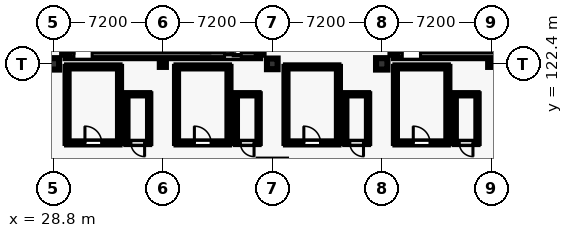
"""IFC4 building model, lengths in metres.
Left out: names, types, materials, properties, quantities, classifications, styles, units other than length and angle.
Written with IfcOpenShell. Run it as: python <this file> out.ifc"""

import sys

from ifc_helpers import new_model, si_unit, direction, frame, frame_2d, origin, origin_2d, place, context, subcontext, project, spatial, rectangle, hollow_rectangle, extrude, element, fill, save


model = new_model("IFC4")
c1 = context("Model", 3, precision=1e-05, world=origin(), true_north=direction((0.0, 1.0)))
c2 = subcontext(c1, "Body", "Model", "MODEL_VIEW")
j1 = project(units=[si_unit("LENGTHUNIT", "METRE"), si_unit("PLANEANGLEUNIT", "RADIAN")], contexts=[c1])
p1 = place(None, origin())
s1 = spatial("IfcSite", under=j1, at=p1, CompositionType="ELEMENT")
p2 = place(p1, origin())
s2 = spatial("IfcBuilding", under=s1, at=p2, CompositionType="ELEMENT")
p3 = place(p2, frame((0.0, 0.0, 9.6)))
s3 = spatial("IfcBuildingStorey", under=s2, at=p3, CompositionType="ELEMENT", Elevation=9.6)
p4 = place(p3, frame((28.8, 122.4, 0.0), z_axis=(0.0, 0.0, 1.0), x_axis=(1.0, 0.0, 0.0)))
e1 = element("IfcColumn", 1, at=p4, inside=s3, PredefinedType="COLUMN", context=c2, shape_type="SweptSolid", body=[
    extrude(rectangle(XDim=0.75, YDim=0.75, at=origin_2d()), origin(), (0.0, 0.0, 1.0), 4.2),
])
p5 = place(p3, frame((36.0, 122.4, 0.0), z_axis=(0.0, 0.0, 1.0), x_axis=(1.0, 0.0, 0.0)))
e2 = element("IfcColumn", 2, at=p5, inside=s3, PredefinedType="COLUMN", context=c2, shape_type="SweptSolid", body=[
    extrude(hollow_rectangle(XDim=0.4, YDim=0.4, WallThickness=0.02, at=origin_2d()), origin(), (0.0, 0.0, 1.0), 4.2),
])
p6 = place(p3, frame((43.2, 122.4, 0.0), z_axis=(0.0, 0.0, 1.0), x_axis=(1.0, 0.0, 0.0)))
e3 = element("IfcColumn", 3, at=p6, inside=s3, PredefinedType="COLUMN", context=c2, shape_type="SweptSolid", body=[
    extrude(rectangle(XDim=0.7, YDim=0.7, at=origin_2d()), origin(), (0.0, 0.0, 1.0), 4.2),
])
p7 = place(p3, frame((50.4, 122.4, 0.0), z_axis=(0.0, 0.0, 1.0), x_axis=(1.0, 0.0, 0.0)))
e4 = element("IfcColumn", 4, at=p7, inside=s3, PredefinedType="COLUMN", context=c2, shape_type="SweptSolid", body=[
    extrude(rectangle(XDim=0.75, YDim=0.75, at=origin_2d()), origin(), (0.0, 0.0, 1.0), 4.2),
])
p8 = place(p3, frame((57.6, 122.4, 0.0), z_axis=(0.0, 0.0, 1.0), x_axis=(1.0, 0.0, 0.0)))
e5 = element("IfcColumn", 5, at=p8, inside=s3, PredefinedType="COLUMN", context=c2, shape_type="SweptSolid", body=[
    extrude(hollow_rectangle(XDim=0.4, YDim=0.4, WallThickness=0.02, at=origin_2d()), origin(), (0.0, 0.0, 1.0), 4.2),
])
p9 = place(p3, frame((29.6, 123.0, 0.0), z_axis=(0.0, 0.0, 1.0), x_axis=(1.0, 0.0, 0.0)))
e6 = element("IfcWall", 6, at=p9, inside=s3, PredefinedType="SHEAR", context=c2, shape_type="SweptSolid", body=[
    extrude(rectangle(XDim=12.8, YDim=0.45, at=frame_2d((6.4, 0.0))), origin(), (0.0, 0.0, 1.0), 3.88),
])
p10 = place(p9, frame((0.55, 0.0, 0.0)))
e7 = element("IfcOpeningElement", 7, at=p10, cuts=e6, PredefinedType="OPENING", context=c2, shape_type="SweptSolid", body=[
    extrude(rectangle(XDim=1.2, YDim=2.25, at=frame_2d((0.6, 1.125))), frame((0.0, 0.235, 0.0), z_axis=(0.0, -1.0, 0.0), x_axis=(1.0, 0.0, 0.0)), (0.0, 0.0, 1.0), 0.47),
])
p11 = place(p9, frame((10.458, 0.0, 0.0)))
e8 = element("IfcOpeningElement", 8, at=p11, cuts=e6, PredefinedType="OPENING", context=c2, shape_type="SweptSolid", body=[
    extrude(rectangle(XDim=1.1, YDim=2.2, at=frame_2d((0.55, 1.1))), frame((0.0, 0.235, 0.0), z_axis=(0.0, -1.0, 0.0), x_axis=(1.0, 0.0, 0.0)), (0.0, 0.0, 1.0), 0.47),
])
for number, where, z_axis, x_axis in (
    (9, (29.6, 123.0, 0.0), (0.0, 0.0, 1.0), (0.0, 1.0, 0.0)),
    (10, (42.4, 123.0, 0.0), (0.0, 0.0, 1.0), (0.0, 1.0, 0.0)),
):
    element("IfcWall", number, at=place(p3, frame(where, z_axis=z_axis, x_axis=x_axis)), inside=s3, PredefinedType="SHEAR", context=c2, shape_type="SweptSolid", body=[
        extrude(rectangle(XDim=6.1, YDim=0.45, at=frame_2d((3.05, 0.0))), origin(), (0.0, 0.0, 1.0), 3.88),
    ])
p12 = place(p3, frame((51.2, 123.0, 0.0), z_axis=(0.0, 0.0, 1.0), x_axis=(1.0, 0.0, 0.0)))
e11 = element("IfcWall", 11, at=p12, inside=s3, PredefinedType="SHEAR", context=c2, shape_type="SweptSolid", body=[
    extrude(rectangle(XDim=12.8, YDim=0.45, at=frame_2d((6.4, 0.0))), origin(), (0.0, 0.0, 1.0), 3.88),
])
p13 = place(p12, frame((0.55, 0.0, 0.0)))
e12 = element("IfcOpeningElement", 12, at=p13, cuts=e11, PredefinedType="OPENING", context=c2, shape_type="SweptSolid", body=[
    extrude(rectangle(XDim=1.2, YDim=2.25, at=frame_2d((0.6, 1.125))), frame((0.0, 0.235, 0.0), z_axis=(0.0, -1.0, 0.0), x_axis=(1.0, 0.0, 0.0)), (0.0, 0.0, 1.0), 0.47),
])
p14 = place(p12, frame((10.458, 0.0, 0.0)))
e13 = element("IfcOpeningElement", 13, at=p14, cuts=e11, PredefinedType="OPENING", context=c2, shape_type="SweptSolid", body=[
    extrude(rectangle(XDim=1.1, YDim=2.2, at=frame_2d((0.55, 1.1))), frame((0.0, 0.235, 0.0), z_axis=(0.0, -1.0, 0.0), x_axis=(1.0, 0.0, 0.0)), (0.0, 0.0, 1.0), 0.47),
])
p15 = place(p3, frame((51.2, 123.0, 0.0), z_axis=(0.0, 0.0, 1.0), x_axis=(0.0, 1.0, 0.0)))
e14 = element("IfcWall", 14, at=p15, inside=s3, PredefinedType="SHEAR", context=c2, shape_type="SweptSolid", body=[
    extrude(rectangle(XDim=6.1, YDim=0.45, at=frame_2d((3.05, 0.0))), origin(), (0.0, 0.0, 1.0), 3.88),
])
p16 = place(p3, frame((29.7, 117.2, 0.0), z_axis=(0.0, 0.0, 1.0), x_axis=(1.0, 0.0, 0.0)))
e15 = element("IfcWall", 15, at=p16, inside=s3, PredefinedType="PARTITIONING", context=c2, shape_type="SweptSolid", body=[
    extrude(rectangle(XDim=3.45, YDim=0.2, at=frame_2d((1.725, 0.0))), origin(), (0.0, 0.0, 1.0), 2.94),
])
p17 = place(p16, frame((1.175, 0.0, 0.0)))
e16 = element("IfcOpeningElement", 16, at=p17, cuts=e15, PredefinedType="OPENING", context=c2, shape_type="SweptSolid", body=[
    extrude(rectangle(XDim=1.1, YDim=2.25, at=frame_2d((0.55, 1.125))), frame((0.0, 0.11, 0.0), z_axis=(0.0, -1.0, 0.0), x_axis=(1.0, 0.0, 0.0)), (0.0, 0.0, 1.0), 0.22),
])
p18 = place(p3, frame((33.15, 117.2, 0.0), z_axis=(0.0, 0.0, 1.0), x_axis=(0.0, 1.0, 0.0)))
e17 = element("IfcWall", 17, at=p18, inside=s3, PredefinedType="PARTITIONING", context=c2, shape_type="SweptSolid", body=[
    extrude(rectangle(XDim=5.0, YDim=0.2, at=frame_2d((2.5, 0.0))), origin(), (0.0, 0.0, 1.0), 2.94),
])
p19 = place(p3, frame((33.15, 122.2, 0.0), z_axis=(0.0, 0.0, 1.0), x_axis=(-1.0, 0.0, 0.0)))
e18 = element("IfcWall", 18, at=p19, inside=s3, PredefinedType="PARTITIONING", context=c2, shape_type="SweptSolid", body=[
    extrude(rectangle(XDim=3.45, YDim=0.2, at=frame_2d((1.725, 0.0))), origin(), (0.0, 0.0, 1.0), 2.94),
])
p20 = place(p3, frame((29.7, 122.2, 0.0), z_axis=(0.0, 0.0, 1.0), x_axis=(0.0, -1.0, 0.0)))
e19 = element("IfcWall", 19, at=p20, inside=s3, PredefinedType="PARTITIONING", context=c2, shape_type="SweptSolid", body=[
    extrude(rectangle(XDim=5.0, YDim=0.2, at=frame_2d((2.5, 0.0))), origin(), (0.0, 0.0, 1.0), 2.94),
])
p21 = place(p3, frame((33.6, 117.2, 0.0), z_axis=(0.0, 0.0, 1.0), x_axis=(1.0, 0.0, 0.0)))
e20 = element("IfcWall", 20, at=p21, inside=s3, PredefinedType="PARTITIONING", context=c2, shape_type="SweptSolid", body=[
    extrude(rectangle(XDim=1.5, YDim=0.15, at=frame_2d((0.75, 0.0))), origin(), (0.0, 0.0, 1.0), 2.94),
])
p22 = place(p21, frame((0.3, 0.0, 0.0)))
e21 = element("IfcOpeningElement", 21, at=p22, cuts=e20, PredefinedType="OPENING", context=c2, shape_type="SweptSolid", body=[
    extrude(rectangle(XDim=0.9, YDim=2.15, at=frame_2d((0.45, 1.075))), frame((0.0, 0.085, 0.0), z_axis=(0.0, -1.0, 0.0), x_axis=(1.0, 0.0, 0.0)), (0.0, 0.0, 1.0), 0.17),
])
p23 = place(p3, frame((35.1, 117.2, 0.0), z_axis=(0.0, 0.0, 1.0), x_axis=(0.0, 1.0, 0.0)))
e22 = element("IfcWall", 22, at=p23, inside=s3, PredefinedType="PARTITIONING", context=c2, shape_type="SweptSolid", body=[
    extrude(rectangle(XDim=3.2, YDim=0.15, at=frame_2d((1.6, 0.0))), origin(), (0.0, 0.0, 1.0), 2.94),
])
p24 = place(p3, frame((35.1, 120.4, 0.0), z_axis=(0.0, 0.0, 1.0), x_axis=(-1.0, 0.0, 0.0)))
e23 = element("IfcWall", 23, at=p24, inside=s3, PredefinedType="PARTITIONING", context=c2, shape_type="SweptSolid", body=[
    extrude(rectangle(XDim=1.5, YDim=0.15, at=frame_2d((0.75, 0.0))), origin(), (0.0, 0.0, 1.0), 2.94),
])
p25 = place(p3, frame((33.6, 120.4, 0.0), z_axis=(0.0, 0.0, 1.0), x_axis=(0.0, -1.0, 0.0)))
e24 = element("IfcWall", 24, at=p25, inside=s3, PredefinedType="PARTITIONING", context=c2, shape_type="SweptSolid", body=[
    extrude(rectangle(XDim=3.2, YDim=0.15, at=frame_2d((1.6, 0.0))), origin(), (0.0, 0.0, 1.0), 2.94),
])
p26 = place(p3, frame((36.9, 117.2, 0.0), z_axis=(0.0, 0.0, 1.0), x_axis=(1.0, 0.0, 0.0)))
e25 = element("IfcWall", 25, at=p26, inside=s3, PredefinedType="PARTITIONING", context=c2, shape_type="SweptSolid", body=[
    extrude(rectangle(XDim=3.45, YDim=0.2, at=frame_2d((1.725, 0.0))), origin(), (0.0, 0.0, 1.0), 2.94),
])
p27 = place(p26, frame((1.175, 0.0, 0.0)))
e26 = element("IfcOpeningElement", 26, at=p27, cuts=e25, PredefinedType="OPENING", context=c2, shape_type="SweptSolid", body=[
    extrude(rectangle(XDim=1.1, YDim=2.25, at=frame_2d((0.55, 1.125))), frame((0.0, 0.11, 0.0), z_axis=(0.0, -1.0, 0.0), x_axis=(1.0, 0.0, 0.0)), (0.0, 0.0, 1.0), 0.22),
])
p28 = place(p3, frame((40.35, 117.2, 0.0), z_axis=(0.0, 0.0, 1.0), x_axis=(0.0, 1.0, 0.0)))
e27 = element("IfcWall", 27, at=p28, inside=s3, PredefinedType="PARTITIONING", context=c2, shape_type="SweptSolid", body=[
    extrude(rectangle(XDim=5.0, YDim=0.2, at=frame_2d((2.5, 0.0))), origin(), (0.0, 0.0, 1.0), 2.94),
])
p29 = place(p3, frame((40.35, 122.2, 0.0), z_axis=(0.0, 0.0, 1.0), x_axis=(-1.0, 0.0, 0.0)))
e28 = element("IfcWall", 28, at=p29, inside=s3, PredefinedType="PARTITIONING", context=c2, shape_type="SweptSolid", body=[
    extrude(rectangle(XDim=3.45, YDim=0.2, at=frame_2d((1.725, 0.0))), origin(), (0.0, 0.0, 1.0), 2.94),
])
p30 = place(p3, frame((36.9, 122.2, 0.0), z_axis=(0.0, 0.0, 1.0), x_axis=(0.0, -1.0, 0.0)))
e29 = element("IfcWall", 29, at=p30, inside=s3, PredefinedType="PARTITIONING", context=c2, shape_type="SweptSolid", body=[
    extrude(rectangle(XDim=5.0, YDim=0.2, at=frame_2d((2.5, 0.0))), origin(), (0.0, 0.0, 1.0), 2.94),
])
p31 = place(p3, frame((40.8, 117.2, 0.0), z_axis=(0.0, 0.0, 1.0), x_axis=(1.0, 0.0, 0.0)))
e30 = element("IfcWall", 30, at=p31, inside=s3, PredefinedType="PARTITIONING", context=c2, shape_type="SweptSolid", body=[
    extrude(rectangle(XDim=1.5, YDim=0.15, at=frame_2d((0.75, 0.0))), origin(), (0.0, 0.0, 1.0), 2.94),
])
p32 = place(p31, frame((0.3, 0.0, 0.0)))
e31 = element("IfcOpeningElement", 31, at=p32, cuts=e30, PredefinedType="OPENING", context=c2, shape_type="SweptSolid", body=[
    extrude(rectangle(XDim=0.9, YDim=2.15, at=frame_2d((0.45, 1.075))), frame((0.0, 0.085, 0.0), z_axis=(0.0, -1.0, 0.0), x_axis=(1.0, 0.0, 0.0)), (0.0, 0.0, 1.0), 0.17),
])
p33 = place(p3, frame((42.3, 117.2, 0.0), z_axis=(0.0, 0.0, 1.0), x_axis=(0.0, 1.0, 0.0)))
e32 = element("IfcWall", 32, at=p33, inside=s3, PredefinedType="PARTITIONING", context=c2, shape_type="SweptSolid", body=[
    extrude(rectangle(XDim=3.2, YDim=0.15, at=frame_2d((1.6, 0.0))), origin(), (0.0, 0.0, 1.0), 2.94),
])
p34 = place(p3, frame((42.3, 120.4, 0.0), z_axis=(0.0, 0.0, 1.0), x_axis=(-1.0, 0.0, 0.0)))
e33 = element("IfcWall", 33, at=p34, inside=s3, PredefinedType="PARTITIONING", context=c2, shape_type="SweptSolid", body=[
    extrude(rectangle(XDim=1.5, YDim=0.15, at=frame_2d((0.75, 0.0))), origin(), (0.0, 0.0, 1.0), 2.94),
])
p35 = place(p3, frame((40.8, 120.4, 0.0), z_axis=(0.0, 0.0, 1.0), x_axis=(0.0, -1.0, 0.0)))
e34 = element("IfcWall", 34, at=p35, inside=s3, PredefinedType="PARTITIONING", context=c2, shape_type="SweptSolid", body=[
    extrude(rectangle(XDim=3.2, YDim=0.15, at=frame_2d((1.6, 0.0))), origin(), (0.0, 0.0, 1.0), 2.94),
])
p36 = place(p3, frame((44.1, 117.2, 0.0), z_axis=(0.0, 0.0, 1.0), x_axis=(1.0, 0.0, 0.0)))
e35 = element("IfcWall", 35, at=p36, inside=s3, PredefinedType="PARTITIONING", context=c2, shape_type="SweptSolid", body=[
    extrude(rectangle(XDim=3.45, YDim=0.2, at=frame_2d((1.725, 0.0))), origin(), (0.0, 0.0, 1.0), 2.94),
])
p37 = place(p36, frame((1.175, 0.0, 0.0)))
e36 = element("IfcOpeningElement", 36, at=p37, cuts=e35, PredefinedType="OPENING", context=c2, shape_type="SweptSolid", body=[
    extrude(rectangle(XDim=1.1, YDim=2.25, at=frame_2d((0.55, 1.125))), frame((0.0, 0.11, 0.0), z_axis=(0.0, -1.0, 0.0), x_axis=(1.0, 0.0, 0.0)), (0.0, 0.0, 1.0), 0.22),
])
p38 = place(p3, frame((47.55, 117.2, 0.0), z_axis=(0.0, 0.0, 1.0), x_axis=(0.0, 1.0, 0.0)))
e37 = element("IfcWall", 37, at=p38, inside=s3, PredefinedType="PARTITIONING", context=c2, shape_type="SweptSolid", body=[
    extrude(rectangle(XDim=5.0, YDim=0.2, at=frame_2d((2.5, 0.0))), origin(), (0.0, 0.0, 1.0), 2.94),
])
p39 = place(p3, frame((47.55, 122.2, 0.0), z_axis=(0.0, 0.0, 1.0), x_axis=(-1.0, 0.0, 0.0)))
e38 = element("IfcWall", 38, at=p39, inside=s3, PredefinedType="PARTITIONING", context=c2, shape_type="SweptSolid", body=[
    extrude(rectangle(XDim=3.45, YDim=0.2, at=frame_2d((1.725, 0.0))), origin(), (0.0, 0.0, 1.0), 2.94),
])
p40 = place(p3, frame((44.1, 122.2, 0.0), z_axis=(0.0, 0.0, 1.0), x_axis=(0.0, -1.0, 0.0)))
e39 = element("IfcWall", 39, at=p40, inside=s3, PredefinedType="PARTITIONING", context=c2, shape_type="SweptSolid", body=[
    extrude(rectangle(XDim=5.0, YDim=0.2, at=frame_2d((2.5, 0.0))), origin(), (0.0, 0.0, 1.0), 2.94),
])
p41 = place(p3, frame((48.0, 117.2, 0.0), z_axis=(0.0, 0.0, 1.0), x_axis=(1.0, 0.0, 0.0)))
e40 = element("IfcWall", 40, at=p41, inside=s3, PredefinedType="PARTITIONING", context=c2, shape_type="SweptSolid", body=[
    extrude(rectangle(XDim=1.5, YDim=0.15, at=frame_2d((0.75, 0.0))), origin(), (0.0, 0.0, 1.0), 2.94),
])
p42 = place(p41, frame((0.3, 0.0, 0.0)))
e41 = element("IfcOpeningElement", 41, at=p42, cuts=e40, PredefinedType="OPENING", context=c2, shape_type="SweptSolid", body=[
    extrude(rectangle(XDim=0.9, YDim=2.15, at=frame_2d((0.45, 1.075))), frame((0.0, 0.085, 0.0), z_axis=(0.0, -1.0, 0.0), x_axis=(1.0, 0.0, 0.0)), (0.0, 0.0, 1.0), 0.17),
])
p43 = place(p3, frame((49.5, 117.2, 0.0), z_axis=(0.0, 0.0, 1.0), x_axis=(0.0, 1.0, 0.0)))
e42 = element("IfcWall", 42, at=p43, inside=s3, PredefinedType="PARTITIONING", context=c2, shape_type="SweptSolid", body=[
    extrude(rectangle(XDim=3.2, YDim=0.15, at=frame_2d((1.6, 0.0))), origin(), (0.0, 0.0, 1.0), 2.94),
])
p44 = place(p3, frame((49.5, 120.4, 0.0), z_axis=(0.0, 0.0, 1.0), x_axis=(-1.0, 0.0, 0.0)))
e43 = element("IfcWall", 43, at=p44, inside=s3, PredefinedType="PARTITIONING", context=c2, shape_type="SweptSolid", body=[
    extrude(rectangle(XDim=1.5, YDim=0.15, at=frame_2d((0.75, 0.0))), origin(), (0.0, 0.0, 1.0), 2.94),
])
p45 = place(p3, frame((48.0, 120.4, 0.0), z_axis=(0.0, 0.0, 1.0), x_axis=(0.0, -1.0, 0.0)))
e44 = element("IfcWall", 44, at=p45, inside=s3, PredefinedType="PARTITIONING", context=c2, shape_type="SweptSolid", body=[
    extrude(rectangle(XDim=3.2, YDim=0.15, at=frame_2d((1.6, 0.0))), origin(), (0.0, 0.0, 1.0), 2.94),
])
p46 = place(p3, frame((51.3, 117.2, 0.0), z_axis=(0.0, 0.0, 1.0), x_axis=(1.0, 0.0, 0.0)))
e45 = element("IfcWall", 45, at=p46, inside=s3, PredefinedType="PARTITIONING", context=c2, shape_type="SweptSolid", body=[
    extrude(rectangle(XDim=3.45, YDim=0.2, at=frame_2d((1.725, 0.0))), origin(), (0.0, 0.0, 1.0), 2.94),
])
p47 = place(p46, frame((1.175, 0.0, 0.0)))
e46 = element("IfcOpeningElement", 46, at=p47, cuts=e45, PredefinedType="OPENING", context=c2, shape_type="SweptSolid", body=[
    extrude(rectangle(XDim=1.1, YDim=2.25, at=frame_2d((0.55, 1.125))), frame((0.0, 0.11, 0.0), z_axis=(0.0, -1.0, 0.0), x_axis=(1.0, 0.0, 0.0)), (0.0, 0.0, 1.0), 0.22),
])
p48 = place(p3, frame((54.75, 117.2, 0.0), z_axis=(0.0, 0.0, 1.0), x_axis=(0.0, 1.0, 0.0)))
e47 = element("IfcWall", 47, at=p48, inside=s3, PredefinedType="PARTITIONING", context=c2, shape_type="SweptSolid", body=[
    extrude(rectangle(XDim=5.0, YDim=0.2, at=frame_2d((2.5, 0.0))), origin(), (0.0, 0.0, 1.0), 2.94),
])
p49 = place(p3, frame((54.75, 122.2, 0.0), z_axis=(0.0, 0.0, 1.0), x_axis=(-1.0, 0.0, 0.0)))
e48 = element("IfcWall", 48, at=p49, inside=s3, PredefinedType="PARTITIONING", context=c2, shape_type="SweptSolid", body=[
    extrude(rectangle(XDim=3.45, YDim=0.2, at=frame_2d((1.725, 0.0))), origin(), (0.0, 0.0, 1.0), 2.94),
])
p50 = place(p3, frame((51.3, 122.2, 0.0), z_axis=(0.0, 0.0, 1.0), x_axis=(0.0, -1.0, 0.0)))
e49 = element("IfcWall", 49, at=p50, inside=s3, PredefinedType="PARTITIONING", context=c2, shape_type="SweptSolid", body=[
    extrude(rectangle(XDim=5.0, YDim=0.2, at=frame_2d((2.5, 0.0))), origin(), (0.0, 0.0, 1.0), 2.94),
])
p51 = place(p3, frame((55.2, 117.2, 0.0), z_axis=(0.0, 0.0, 1.0), x_axis=(1.0, 0.0, 0.0)))
e50 = element("IfcWall", 50, at=p51, inside=s3, PredefinedType="PARTITIONING", context=c2, shape_type="SweptSolid", body=[
    extrude(rectangle(XDim=1.5, YDim=0.15, at=frame_2d((0.75, 0.0))), origin(), (0.0, 0.0, 1.0), 2.94),
])
p52 = place(p51, frame((0.3, 0.0, 0.0)))
e51 = element("IfcOpeningElement", 51, at=p52, cuts=e50, PredefinedType="OPENING", context=c2, shape_type="SweptSolid", body=[
    extrude(rectangle(XDim=0.9, YDim=2.15, at=frame_2d((0.45, 1.075))), frame((0.0, 0.085, 0.0), z_axis=(0.0, -1.0, 0.0), x_axis=(1.0, 0.0, 0.0)), (0.0, 0.0, 1.0), 0.17),
])
p53 = place(p3, frame((56.7, 117.2, 0.0), z_axis=(0.0, 0.0, 1.0), x_axis=(0.0, 1.0, 0.0)))
e52 = element("IfcWall", 52, at=p53, inside=s3, PredefinedType="PARTITIONING", context=c2, shape_type="SweptSolid", body=[
    extrude(rectangle(XDim=3.2, YDim=0.15, at=frame_2d((1.6, 0.0))), origin(), (0.0, 0.0, 1.0), 2.94),
])
p54 = place(p3, frame((56.7, 120.4, 0.0), z_axis=(0.0, 0.0, 1.0), x_axis=(-1.0, 0.0, 0.0)))
e53 = element("IfcWall", 53, at=p54, inside=s3, PredefinedType="PARTITIONING", context=c2, shape_type="SweptSolid", body=[
    extrude(rectangle(XDim=1.5, YDim=0.15, at=frame_2d((0.75, 0.0))), origin(), (0.0, 0.0, 1.0), 2.94),
])
p55 = place(p3, frame((55.2, 120.4, 0.0), z_axis=(0.0, 0.0, 1.0), x_axis=(0.0, -1.0, 0.0)))
e54 = element("IfcWall", 54, at=p55, inside=s3, PredefinedType="PARTITIONING", context=c2, shape_type="SweptSolid", body=[
    extrude(rectangle(XDim=3.2, YDim=0.15, at=frame_2d((1.6, 0.0))), origin(), (0.0, 0.0, 1.0), 2.94),
])
p56 = place(p10, origin())
e55 = element("IfcDoor", 55, at=p56, inside=s3, OperationType="SINGLE_SWING_LEFT", PredefinedType="DOOR", context=c2, shape_type="SweptSolid", body=[
    extrude(rectangle(XDim=1.2, YDim=2.25, at=frame_2d((0.6, 1.125))), frame((0.0, 0.025, 0.0), z_axis=(0.0, -1.0, 0.0), x_axis=(1.0, 0.0, 0.0)), (0.0, 0.0, 1.0), 0.05),
])
fill(e7, e55)
p57 = place(p11, origin())
e56 = element("IfcDoor", 56, at=p57, inside=s3, OperationType="SLIDING_TO_RIGHT", PredefinedType="DOOR", context=c2, shape_type="SweptSolid", body=[
    extrude(rectangle(XDim=1.1, YDim=2.2, at=frame_2d((0.55, 1.1))), frame((0.0, 0.025, 0.0), z_axis=(0.0, -1.0, 0.0), x_axis=(1.0, 0.0, 0.0)), (0.0, 0.0, 1.0), 0.05),
])
fill(e8, e56)
p58 = place(p13, origin())
e57 = element("IfcDoor", 57, at=p58, inside=s3, OperationType="SINGLE_SWING_RIGHT", PredefinedType="DOOR", context=c2, shape_type="SweptSolid", body=[
    extrude(rectangle(XDim=1.2, YDim=2.25, at=frame_2d((0.6, 1.125))), frame((0.0, 0.025, 0.0), z_axis=(0.0, -1.0, 0.0), x_axis=(1.0, 0.0, 0.0)), (0.0, 0.0, 1.0), 0.05),
])
fill(e12, e57)
p59 = place(p17, origin())
e58 = element("IfcDoor", 58, at=p59, inside=s3, OperationType="SINGLE_SWING_LEFT", PredefinedType="DOOR", context=c2, shape_type="SweptSolid", body=[
    extrude(rectangle(XDim=1.1, YDim=2.25, at=frame_2d((0.55, 1.125))), frame((0.0, 0.025, 0.0), z_axis=(0.0, -1.0, 0.0), x_axis=(1.0, 0.0, 0.0)), (0.0, 0.0, 1.0), 0.05),
])
fill(e16, e58)
p60 = place(p22, frame((0.9, 0.0, 0.0), z_axis=(0.0, 0.0, 1.0), x_axis=(-1.0, 0.0, 0.0)))
e59 = element("IfcDoor", 59, at=p60, inside=s3, OperationType="SINGLE_SWING_RIGHT", PredefinedType="DOOR", context=c2, shape_type="SweptSolid", body=[
    extrude(rectangle(XDim=0.9, YDim=2.15, at=frame_2d((0.45, 1.075))), frame((0.0, 0.025, 0.0), z_axis=(0.0, -1.0, 0.0), x_axis=(1.0, 0.0, 0.0)), (0.0, 0.0, 1.0), 0.05),
])
fill(e21, e59)
p61 = place(p27, origin())
e60 = element("IfcDoor", 60, at=p61, inside=s3, OperationType="SINGLE_SWING_LEFT", PredefinedType="DOOR", context=c2, shape_type="SweptSolid", body=[
    extrude(rectangle(XDim=1.1, YDim=2.25, at=frame_2d((0.55, 1.125))), frame((0.0, 0.025, 0.0), z_axis=(0.0, -1.0, 0.0), x_axis=(1.0, 0.0, 0.0)), (0.0, 0.0, 1.0), 0.05),
])
fill(e26, e60)
p62 = place(p32, frame((0.9, 0.0, 0.0), z_axis=(0.0, 0.0, 1.0), x_axis=(-1.0, 0.0, 0.0)))
e61 = element("IfcDoor", 61, at=p62, inside=s3, OperationType="SINGLE_SWING_RIGHT", PredefinedType="DOOR", context=c2, shape_type="SweptSolid", body=[
    extrude(rectangle(XDim=0.9, YDim=2.15, at=frame_2d((0.45, 1.075))), frame((0.0, 0.025, 0.0), z_axis=(0.0, -1.0, 0.0), x_axis=(1.0, 0.0, 0.0)), (0.0, 0.0, 1.0), 0.05),
])
fill(e31, e61)
p63 = place(p37, origin())
e62 = element("IfcDoor", 62, at=p63, inside=s3, OperationType="SINGLE_SWING_LEFT", PredefinedType="DOOR", context=c2, shape_type="SweptSolid", body=[
    extrude(rectangle(XDim=1.1, YDim=2.25, at=frame_2d((0.55, 1.125))), frame((0.0, 0.025, 0.0), z_axis=(0.0, -1.0, 0.0), x_axis=(1.0, 0.0, 0.0)), (0.0, 0.0, 1.0), 0.05),
])
fill(e36, e62)
p64 = place(p42, frame((0.9, 0.0, 0.0), z_axis=(0.0, 0.0, 1.0), x_axis=(-1.0, 0.0, 0.0)))
e63 = element("IfcDoor", 63, at=p64, inside=s3, OperationType="SINGLE_SWING_RIGHT", PredefinedType="DOOR", context=c2, shape_type="SweptSolid", body=[
    extrude(rectangle(XDim=0.9, YDim=2.15, at=frame_2d((0.45, 1.075))), frame((0.0, 0.025, 0.0), z_axis=(0.0, -1.0, 0.0), x_axis=(1.0, 0.0, 0.0)), (0.0, 0.0, 1.0), 0.05),
])
fill(e41, e63)
p65 = place(p47, origin())
e64 = element("IfcDoor", 64, at=p65, inside=s3, OperationType="SINGLE_SWING_LEFT", PredefinedType="DOOR", context=c2, shape_type="SweptSolid", body=[
    extrude(rectangle(XDim=1.1, YDim=2.25, at=frame_2d((0.55, 1.125))), frame((0.0, 0.025, 0.0), z_axis=(0.0, -1.0, 0.0), x_axis=(1.0, 0.0, 0.0)), (0.0, 0.0, 1.0), 0.05),
])
fill(e46, e64)
p66 = place(p52, frame((0.9, 0.0, 0.0), z_axis=(0.0, 0.0, 1.0), x_axis=(-1.0, 0.0, 0.0)))
e65 = element("IfcDoor", 65, at=p66, inside=s3, OperationType="SINGLE_SWING_RIGHT", PredefinedType="DOOR", context=c2, shape_type="SweptSolid", body=[
    extrude(rectangle(XDim=0.9, YDim=2.15, at=frame_2d((0.45, 1.075))), frame((0.0, 0.025, 0.0), z_axis=(0.0, -1.0, 0.0), x_axis=(1.0, 0.0, 0.0)), (0.0, 0.0, 1.0), 0.05),
])
fill(e51, e65)
save(model, sys.argv[1])
